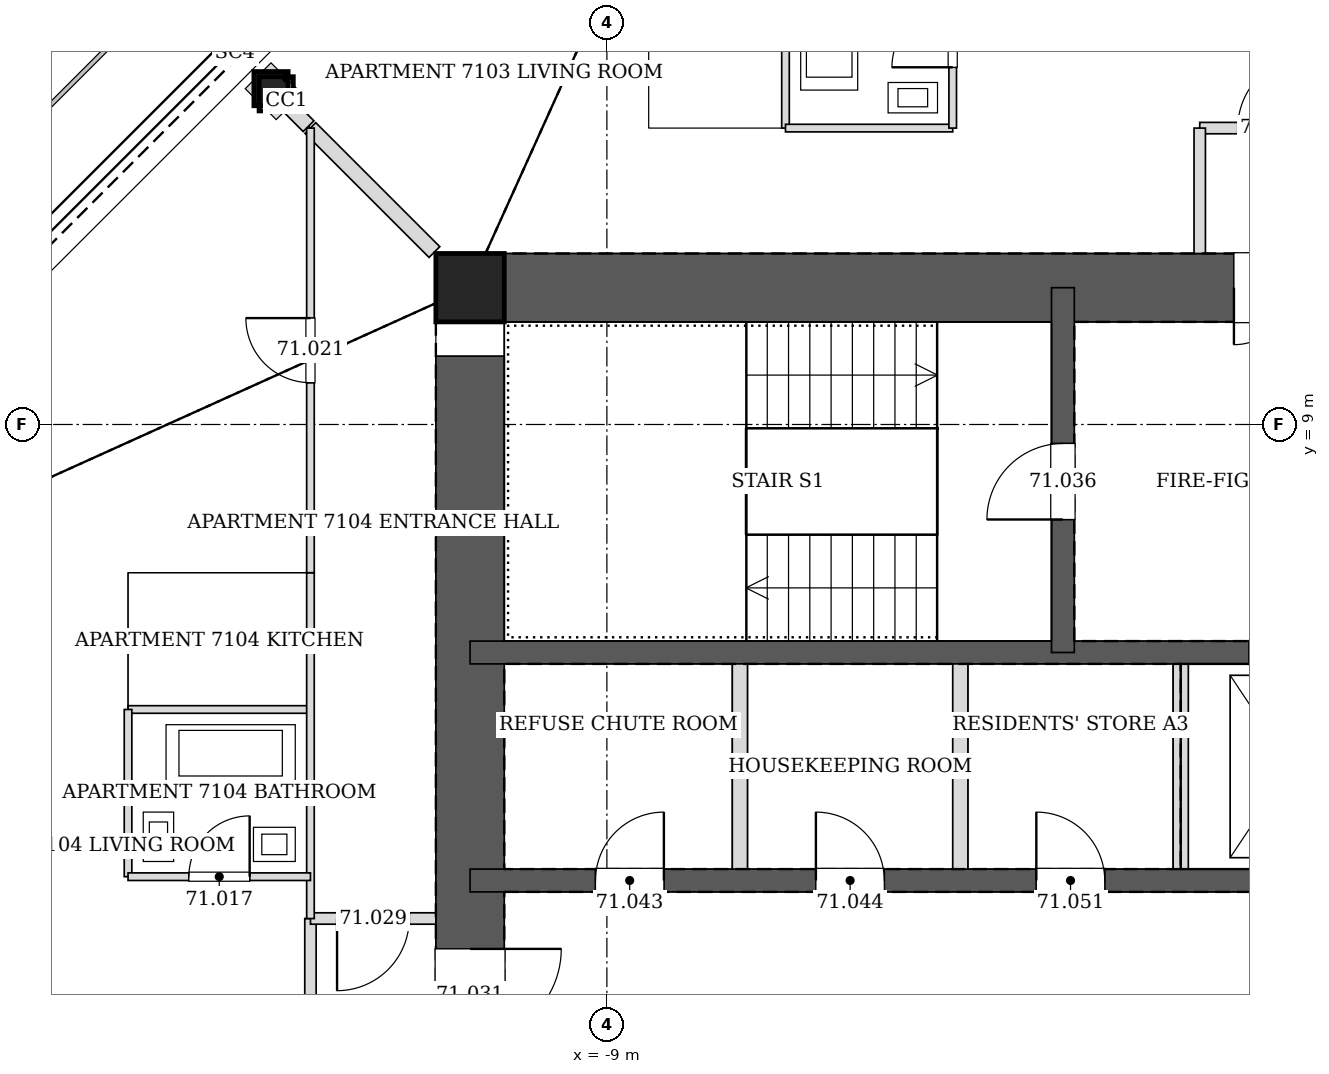
"""IFC4 building model, lengths in metres.
Left out: names, types, materials, properties, quantities, classifications, styles, units other than length and angle.
Written with IfcOpenShell. Run it as: python <this file> out.ifc"""

import sys

from ifc_helpers import new_model, si_unit, direction, frame, frame_2d, origin, origin_2d, place, context, subcontext, project, spatial, rectangle, hollow_rectangle, extrude, element, fill, save


model = new_model("IFC4")
c1 = context("Model", 3, precision=1e-05, world=origin(), true_north=direction((0.0, 1.0)))
c2 = subcontext(c1, "Body", "Model", "MODEL_VIEW")
j1 = project(units=[si_unit("LENGTHUNIT", "METRE"), si_unit("PLANEANGLEUNIT", "RADIAN")], contexts=[c1])
p1 = place(None, origin())
s1 = spatial("IfcSite", under=j1, at=p1, CompositionType="ELEMENT")
p2 = place(p1, origin())
s2 = spatial("IfcBuilding", under=s1, at=p2, CompositionType="ELEMENT")
p3 = place(p2, frame((0.0, 0.0, 291.2)))
s3 = spatial("IfcBuildingStorey", under=s2, at=p3, CompositionType="ELEMENT", Elevation=291.2)
p4 = place(p3, frame((-13.419, 13.419, 0.0), z_axis=(0.020024994503, -0.020024994503, 0.999598919162), x_axis=(0.707106781187, 0.707106781187, 0.0)))
e1 = element("IfcColumn", 1, at=p4, inside=s3, PredefinedType="COLUMN", context=c2, shape_type="SweptSolid", body=[
    extrude(hollow_rectangle(XDim=0.45, YDim=0.45, WallThickness=0.02, at=origin_2d()), origin(), (0.0, 0.0, 1.0), 3.402),
])
p5 = place(p3, frame((-10.8, 10.8, 0.0), z_axis=(0.0, 0.0, 1.0), x_axis=(1.0, 0.0, 0.0)))
e2 = element("IfcColumn", 2, at=p5, inside=s3, PredefinedType="COLUMN", context=c2, shape_type="SweptSolid", body=[
    extrude(hollow_rectangle(XDim=0.9, YDim=0.9, WallThickness=0.04, at=origin_2d()), origin(), (0.0, 0.0, 1.0), 3.4),
])
p6 = place(p3, frame((10.8, 10.8, 0.0), z_axis=(0.0, 0.0, 1.0), x_axis=(-1.0, 0.0, 0.0)))
e3 = element("IfcWall", 3, at=p6, inside=s3, PredefinedType="SOLIDWALL", context=c2, shape_type="SweptSolid", body=[
    extrude(rectangle(XDim=21.6, YDim=0.9, at=frame_2d((10.8, 0.0))), origin(), (0.0, 0.0, 1.0), 3.4),
])
p7 = place(p6, frame((10.05, 0.0, 0.0)))
e4 = element("IfcOpeningElement", 4, at=p7, cuts=e3, PredefinedType="OPENING", context=c2, shape_type="SweptSolid", body=[
    extrude(rectangle(XDim=1.5, YDim=2.1, at=frame_2d((0.75, 1.05))), frame((0.0, 0.46, 0.0), z_axis=(0.0, -1.0, 0.0), x_axis=(1.0, 0.0, 0.0)), (0.0, 0.0, 1.0), 0.92),
])
p8 = place(p3, frame((-10.8, 10.8, 0.0), z_axis=(0.0, 0.0, 1.0), x_axis=(0.0, -1.0, 0.0)))
e5 = element("IfcWall", 5, at=p8, inside=s3, PredefinedType="SOLIDWALL", context=c2, shape_type="SweptSolid", body=[
    extrude(rectangle(XDim=21.6, YDim=0.9, at=frame_2d((10.8, 0.0))), origin(), (0.0, 0.0, 1.0), 3.4),
])
p9 = place(p8, frame((8.7, 0.0, 0.0)))
e6 = element("IfcOpeningElement", 6, at=p9, cuts=e5, PredefinedType="OPENING", context=c2, shape_type="SweptSolid", body=[
    extrude(rectangle(XDim=1.2, YDim=2.1, at=frame_2d((0.6, 1.05))), frame((0.0, 0.46, 0.0), z_axis=(0.0, -1.0, 0.0), x_axis=(1.0, 0.0, 0.0)), (0.0, 0.0, 1.0), 0.92),
])
p10 = place(p8, frame((11.7, 0.0, 0.0)))
e7 = element("IfcOpeningElement", 7, at=p10, cuts=e5, PredefinedType="OPENING", context=c2, shape_type="SweptSolid", body=[
    extrude(rectangle(XDim=1.2, YDim=2.1, at=frame_2d((0.6, 1.05))), frame((0.0, 0.46, 0.0), z_axis=(0.0, -1.0, 0.0), x_axis=(1.0, 0.0, 0.0)), (0.0, 0.0, 1.0), 0.92),
])
p11 = place(p3, frame((-10.8, 3.0, 0.0), z_axis=(0.0, 0.0, 1.0), x_axis=(1.0, 0.0, 0.0)))
e8 = element("IfcWall", 8, at=p11, inside=s3, PredefinedType="SOLIDWALL", context=c2, shape_type="SweptSolid", body=[
    extrude(rectangle(XDim=21.6, YDim=0.3, at=frame_2d((10.8, 0.0))), origin(), (0.0, 0.0, 1.0), 3.4),
])
p12 = place(p11, frame((1.65, 0.0, 0.0)))
e9 = element("IfcOpeningElement", 9, at=p12, cuts=e8, PredefinedType="OPENING", context=c2, shape_type="SweptSolid", body=[
    extrude(rectangle(XDim=0.9, YDim=2.1, at=frame_2d((0.45, 1.05))), frame((0.0, 0.16, 0.0), z_axis=(0.0, -1.0, 0.0), x_axis=(1.0, 0.0, 0.0)), (0.0, 0.0, 1.0), 0.32),
])
p13 = place(p11, frame((4.55, 0.0, 0.0)))
e10 = element("IfcOpeningElement", 10, at=p13, cuts=e8, PredefinedType="OPENING", context=c2, shape_type="SweptSolid", body=[
    extrude(rectangle(XDim=0.9, YDim=2.1, at=frame_2d((0.45, 1.05))), frame((0.0, 0.16, 0.0), z_axis=(0.0, -1.0, 0.0), x_axis=(1.0, 0.0, 0.0)), (0.0, 0.0, 1.0), 0.32),
])
p14 = place(p11, frame((13.25, 0.0, 0.0)))
e11 = element("IfcOpeningElement", 11, at=p14, cuts=e8, PredefinedType="OPENING", context=c2, shape_type="SweptSolid", body=[
    extrude(rectangle(XDim=0.9, YDim=2.1, at=frame_2d((0.45, 1.05))), frame((0.0, 0.16, 0.0), z_axis=(0.0, -1.0, 0.0), x_axis=(1.0, 0.0, 0.0)), (0.0, 0.0, 1.0), 0.32),
])
p15 = place(p11, frame((16.15, 0.0, 0.0)))
e12 = element("IfcOpeningElement", 12, at=p15, cuts=e8, PredefinedType="OPENING", context=c2, shape_type="SweptSolid", body=[
    extrude(rectangle(XDim=0.9, YDim=2.1, at=frame_2d((0.45, 1.05))), frame((0.0, 0.16, 0.0), z_axis=(0.0, -1.0, 0.0), x_axis=(1.0, 0.0, 0.0)), (0.0, 0.0, 1.0), 0.32),
])
p16 = place(p11, frame((7.45, 0.0, 0.0)))
e13 = element("IfcOpeningElement", 13, at=p16, cuts=e8, PredefinedType="OPENING", context=c2, shape_type="SweptSolid", body=[
    extrude(rectangle(XDim=0.9, YDim=2.1, at=frame_2d((0.45, 1.05))), frame((0.0, 0.16, 0.0), z_axis=(0.0, -1.0, 0.0), x_axis=(1.0, 0.0, 0.0)), (0.0, 0.0, 1.0), 0.32),
])
p17 = place(p11, frame((19.05, 0.0, 0.0)))
e14 = element("IfcOpeningElement", 14, at=p17, cuts=e8, PredefinedType="OPENING", context=c2, shape_type="SweptSolid", body=[
    extrude(rectangle(XDim=0.9, YDim=2.1, at=frame_2d((0.45, 1.05))), frame((0.0, 0.16, 0.0), z_axis=(0.0, -1.0, 0.0), x_axis=(1.0, 0.0, 0.0)), (0.0, 0.0, 1.0), 0.32),
])
p18 = place(p3, frame((-10.8, 6.0, 0.0), z_axis=(0.0, 0.0, 1.0), x_axis=(1.0, 0.0, 0.0)))
e15 = element("IfcWall", 15, at=p18, inside=s3, PredefinedType="SOLIDWALL", context=c2, shape_type="SweptSolid", body=[
    extrude(rectangle(XDim=21.6, YDim=0.3, at=frame_2d((10.8, 0.0))), origin(), (0.0, 0.0, 1.0), 3.4),
])
p19 = place(p18, frame((10.25, 0.0, 0.0)))
e16 = element("IfcOpeningElement", 16, at=p19, cuts=e15, PredefinedType="OPENING", context=c2, shape_type="SweptSolid", body=[
    extrude(rectangle(XDim=1.1, YDim=2.1, at=frame_2d((0.55, 1.05))), frame((0.0, 0.16, 0.0), z_axis=(0.0, -1.0, 0.0), x_axis=(1.0, 0.0, 0.0)), (0.0, 0.0, 1.0), 0.32),
])
p20 = place(p3, frame((-3.0, 6.0, 0.0), z_axis=(0.0, 0.0, 1.0), x_axis=(0.0, 1.0, 0.0)))
e17 = element("IfcWall", 17, at=p20, inside=s3, PredefinedType="SOLIDWALL", context=c2, shape_type="SweptSolid", body=[
    extrude(rectangle(XDim=4.8, YDim=0.3, at=frame_2d((2.4, 0.0))), origin(), (0.0, 0.0, 1.0), 3.4),
])
p21 = place(p20, frame((1.75, 0.0, 0.0)))
e18 = element("IfcOpeningElement", 18, at=p21, cuts=e17, PredefinedType="OPENING", context=c2, shape_type="SweptSolid", body=[
    extrude(rectangle(XDim=1.0, YDim=2.1, at=frame_2d((0.5, 1.05))), frame((0.0, 0.16, 0.0), z_axis=(0.0, -1.0, 0.0), x_axis=(1.0, 0.0, 0.0)), (0.0, 0.0, 1.0), 0.32),
])
p22 = place(p3, frame((0.751, 12.9, 0.0), z_axis=(0.0, 0.0, 1.0), x_axis=(-1.0, 0.0, 0.0)))
e19 = element("IfcWall", 19, at=p22, inside=s3, PredefinedType="PARTITIONING", context=c2, shape_type="SweptSolid", body=[
    extrude(rectangle(XDim=1.951, YDim=0.15, at=frame_2d((0.976, 0.0))), origin(), (0.0, 0.0, 1.0), 2.349),
])
p23 = place(p22, frame((0.5, 0.0, 0.0)))
e20 = element("IfcOpeningElement", 20, at=p23, cuts=e19, PredefinedType="OPENING", context=c2, shape_type="SweptSolid", body=[
    extrude(rectangle(XDim=0.95, YDim=2.1, at=frame_2d((0.475, 1.05))), frame((0.0, 0.085, 0.0), z_axis=(0.0, -1.0, 0.0), x_axis=(1.0, 0.0, 0.0)), (0.0, 0.0, 1.0), 0.17),
])
p24 = place(p3, frame((-1.2, 12.9, 0.0), z_axis=(0.0, 0.0, 1.0), x_axis=(0.0, -1.0, 0.0)))
e21 = element("IfcWall", 21, at=p24, inside=s3, PredefinedType="PARTITIONING", context=c2, shape_type="SweptSolid", body=[
    extrude(rectangle(XDim=1.65, YDim=0.15, at=frame_2d((0.825, 0.0))), origin(), (0.0, 0.0, 1.0), 3.2),
])
p25 = place(p3, frame((-12.9, 2.5, 0.0), z_axis=(0.0, 0.0, 1.0), x_axis=(0.0, -1.0, 0.0)))
e22 = element("IfcWall", 22, at=p25, inside=s3, PredefinedType="PARTITIONING", context=c2, shape_type="SweptSolid", body=[
    extrude(rectangle(XDim=9.251, YDim=0.15, at=frame_2d((4.625, 0.0))), origin(), (0.0, 0.0, 1.0), 2.349),
])
p26 = place(p3, frame((-11.25, 2.5, 0.0), z_axis=(0.0, 0.0, 1.0), x_axis=(-1.0, 0.0, 0.0)))
e23 = element("IfcWall", 23, at=p26, inside=s3, PredefinedType="PARTITIONING", context=c2, shape_type="SweptSolid", body=[
    extrude(rectangle(XDim=1.65, YDim=0.15, at=frame_2d((0.825, 0.0))), origin(), (0.0, 0.0, 1.0), 3.2),
])
p27 = place(p26, frame((0.35, 0.0, 0.0)))
e24 = element("IfcOpeningElement", 24, at=p27, cuts=e23, PredefinedType="OPENING", context=c2, shape_type="SweptSolid", body=[
    extrude(rectangle(XDim=0.95, YDim=2.1, at=frame_2d((0.475, 1.05))), frame((0.0, 0.085, 0.0), z_axis=(0.0, -1.0, 0.0), x_axis=(1.0, 0.0, 0.0)), (0.0, 0.0, 1.0), 0.17),
])
p28 = place(p3, frame((-6.65, 12.9, 0.0), z_axis=(0.0, 0.0, 1.0), x_axis=(0.0, 1.0, 0.0)))
e25 = element("IfcWall", 25, at=p28, inside=s3, PredefinedType="PARTITIONING", context=c2, shape_type="SweptSolid", body=[
    extrude(rectangle(XDim=2.4, YDim=0.1, at=frame_2d((1.2, 0.0))), origin(), (0.0, 0.0, 1.0), 2.73),
])
p29 = place(p3, frame((-6.65, 12.9, 0.0), z_axis=(0.0, 0.0, 1.0), x_axis=(1.0, 0.0, 0.0)))
e26 = element("IfcWall", 26, at=p29, inside=s3, PredefinedType="PARTITIONING", context=c2, shape_type="SweptSolid", body=[
    extrude(rectangle(XDim=2.2, YDim=0.1, at=frame_2d((1.1, 0.0))), origin(), (0.0, 0.0, 1.0), 3.2),
])
p30 = place(p3, frame((-4.45, 12.9, 0.0), z_axis=(0.0, 0.0, 1.0), x_axis=(0.0, 1.0, 0.0)))
e27 = element("IfcWall", 27, at=p30, inside=s3, PredefinedType="PARTITIONING", context=c2, shape_type="SweptSolid", body=[
    extrude(rectangle(XDim=2.4, YDim=0.1, at=frame_2d((1.2, 0.0))), origin(), (0.0, 0.0, 1.0), 2.73),
])
p31 = place(p30, frame((0.8, 0.0, 0.0)))
e28 = element("IfcOpeningElement", 28, at=p31, cuts=e27, PredefinedType="OPENING", context=c2, shape_type="SweptSolid", body=[
    extrude(rectangle(XDim=0.8, YDim=2.1, at=frame_2d((0.4, 1.05))), frame((0.0, 0.06, 0.0), z_axis=(0.0, -1.0, 0.0), x_axis=(1.0, 0.0, 0.0)), (0.0, 0.0, 1.0), 0.12),
])
p32 = place(p3, frame((-13.178, 13.178, 0.0), z_axis=(0.0, 0.0, 1.0), x_axis=(0.707106781187, -0.707106781187, 0.0)))
e29 = element("IfcWall", 29, at=p32, inside=s3, PredefinedType="PARTITIONING", context=c2, shape_type="SweptSolid", body=[
    extrude(rectangle(XDim=0.358, YDim=0.2, at=frame_2d((0.179, 0.0))), origin(), (0.0, 0.0, 1.0), 2.591),
])
p33 = place(p3, frame((-12.901, 12.901, 0.0), z_axis=(0.0, 0.0, 1.0), x_axis=(0.707106781187, -0.707106781187, 0.0)))
e30 = element("IfcWall", 30, at=p33, inside=s3, PredefinedType="PARTITIONING", context=c2, shape_type="SweptSolid", body=[
    extrude(rectangle(XDim=2.308, YDim=0.2, at=frame_2d((1.154, 0.0))), origin(), (0.0, 0.0, 1.0), 2.591),
])
p34 = place(p3, frame((-15.3, 5.25, 0.0), z_axis=(0.0, 0.0, 1.0), x_axis=(1.0, 0.0, 0.0)))
e31 = element("IfcWall", 31, at=p34, inside=s3, PredefinedType="PARTITIONING", context=c2, shape_type="SweptSolid", body=[
    extrude(rectangle(XDim=2.4, YDim=0.1, at=frame_2d((1.2, 0.0))), origin(), (0.0, 0.0, 1.0), 2.73),
])
p35 = place(p3, frame((-12.9, 7.05, 0.0), z_axis=(0.0, 0.0, 1.0), x_axis=(0.0, -1.0, 0.0)))
e32 = element("IfcWall", 32, at=p35, inside=s3, PredefinedType="PARTITIONING", context=c2, shape_type="SweptSolid", body=[
    extrude(rectangle(XDim=4.551, YDim=0.1, at=frame_2d((2.275, 0.0))), origin(), (0.0, 0.0, 1.0), 3.2),
])
p36 = place(p3, frame((-15.3, 5.25, 0.0), z_axis=(0.0, 0.0, 1.0), x_axis=(0.0, -1.0, 0.0)))
e33 = element("IfcWall", 33, at=p36, inside=s3, PredefinedType="PARTITIONING", context=c2, shape_type="SweptSolid", body=[
    extrude(rectangle(XDim=2.2, YDim=0.1, at=frame_2d((1.1, 0.0))), origin(), (0.0, 0.0, 1.0), 3.2),
])
p37 = place(p3, frame((-15.3, 3.05, 0.0), z_axis=(0.0, 0.0, 1.0), x_axis=(1.0, 0.0, 0.0)))
e34 = element("IfcWall", 34, at=p37, inside=s3, PredefinedType="PARTITIONING", context=c2, shape_type="SweptSolid", body=[
    extrude(rectangle(XDim=2.4, YDim=0.1, at=frame_2d((1.2, 0.0))), origin(), (0.0, 0.0, 1.0), 2.73),
])
p38 = place(p37, frame((0.8, 0.0, 0.0)))
e35 = element("IfcOpeningElement", 35, at=p38, cuts=e34, PredefinedType="OPENING", context=c2, shape_type="SweptSolid", body=[
    extrude(rectangle(XDim=0.8, YDim=2.1, at=frame_2d((0.4, 1.05))), frame((0.0, 0.06, 0.0), z_axis=(0.0, -1.0, 0.0), x_axis=(1.0, 0.0, 0.0)), (0.0, 0.0, 1.0), 0.12),
])
p39 = place(p3, frame((-12.9, 7.05, 0.0), z_axis=(0.0, 0.0, 1.0), x_axis=(0.0, 1.0, 0.0)))
e36 = element("IfcWall", 36, at=p39, inside=s3, PredefinedType="PARTITIONING", context=c2, shape_type="SweptSolid", body=[
    extrude(rectangle(XDim=5.85, YDim=0.1, at=frame_2d((2.925, 0.0))), origin(), (0.0, 0.0, 1.0), 2.497),
])
p40 = place(p39, frame((2.5, 0.0, 0.0)))
e37 = element("IfcOpeningElement", 37, at=p40, cuts=e36, PredefinedType="OPENING", context=c2, shape_type="SweptSolid", body=[
    extrude(rectangle(XDim=0.85, YDim=2.1, at=frame_2d((0.425, 1.05))), frame((0.0, 0.06, 0.0), z_axis=(0.0, -1.0, 0.0), x_axis=(1.0, 0.0, 0.0)), (0.0, 0.0, 1.0), 0.12),
])
for number, where, z_axis, x_axis in (
    (38, (-7.25, 3.15, 0.0), (0.0, 0.0, 1.0), (0.0, 1.0, 0.0)),
    (39, (-4.35, 3.15, 0.0), (0.0, 0.0, 1.0), (0.0, 1.0, 0.0)),
    (40, (-1.45, 3.15, 0.0), (0.0, 0.0, 1.0), (0.0, 1.0, 0.0)),
):
    element("IfcWall", number, at=place(p3, frame(where, z_axis=z_axis, x_axis=x_axis)), inside=s3, PredefinedType="PARTITIONING", context=c2, shape_type="SweptSolid", body=[
        extrude(rectangle(XDim=2.7, YDim=0.2, at=frame_2d((1.35, 0.0))), origin(), (0.0, 0.0, 1.0), 3.2),
    ])
p41 = place(p31, origin())
e41 = element("IfcDoor", 41, at=p41, inside=s3, OperationType="SINGLE_SWING_LEFT", PredefinedType="DOOR", context=c2, shape_type="SweptSolid", body=[
    extrude(rectangle(XDim=0.8, YDim=2.1, at=frame_2d((0.4, 1.05))), frame((0.0, 0.025, 0.0), z_axis=(0.0, -1.0, 0.0), x_axis=(1.0, 0.0, 0.0)), (0.0, 0.0, 1.0), 0.05),
])
fill(e28, e41)
p42 = place(p23, frame((0.95, 0.0, 0.0), z_axis=(0.0, 0.0, 1.0), x_axis=(-1.0, 0.0, 0.0)))
e42 = element("IfcDoor", 42, at=p42, inside=s3, OperationType="SINGLE_SWING_RIGHT", PredefinedType="DOOR", context=c2, shape_type="SweptSolid", body=[
    extrude(rectangle(XDim=0.95, YDim=2.1, at=frame_2d((0.475, 1.05))), frame((0.0, 0.025, 0.0), z_axis=(0.0, -1.0, 0.0), x_axis=(1.0, 0.0, 0.0)), (0.0, 0.0, 1.0), 0.05),
])
fill(e20, e42)
p43 = place(p38, origin())
e43 = element("IfcDoor", 43, at=p43, inside=s3, OperationType="SINGLE_SWING_RIGHT", PredefinedType="DOOR", context=c2, shape_type="SweptSolid", body=[
    extrude(rectangle(XDim=0.8, YDim=2.1, at=frame_2d((0.4, 1.05))), frame((0.0, 0.025, 0.0), z_axis=(0.0, -1.0, 0.0), x_axis=(1.0, 0.0, 0.0)), (0.0, 0.0, 1.0), 0.05),
])
fill(e35, e43)
p44 = place(p40, origin())
e44 = element("IfcDoor", 44, at=p44, inside=s3, OperationType="SINGLE_SWING_RIGHT", PredefinedType="DOOR", context=c2, shape_type="SweptSolid", body=[
    extrude(rectangle(XDim=0.85, YDim=2.1, at=frame_2d((0.425, 1.05))), frame((0.0, 0.025, 0.0), z_axis=(0.0, -1.0, 0.0), x_axis=(1.0, 0.0, 0.0)), (0.0, 0.0, 1.0), 0.05),
])
fill(e37, e44)
p45 = place(p27, origin())
e45 = element("IfcDoor", 45, at=p45, inside=s3, OperationType="SINGLE_SWING_RIGHT", PredefinedType="DOOR", context=c2, shape_type="SweptSolid", body=[
    extrude(rectangle(XDim=0.95, YDim=2.1, at=frame_2d((0.475, 1.05))), frame((0.0, 0.025, 0.0), z_axis=(0.0, -1.0, 0.0), x_axis=(1.0, 0.0, 0.0)), (0.0, 0.0, 1.0), 0.05),
])
fill(e24, e45)
p46 = place(p9, origin())
e46 = element("IfcDoor", 46, at=p46, inside=s3, OperationType="SINGLE_SWING_LEFT", PredefinedType="DOOR", context=c2, shape_type="SweptSolid", body=[
    extrude(rectangle(XDim=1.2, YDim=2.1, at=frame_2d((0.6, 1.05))), frame((0.0, 0.025, 0.0), z_axis=(0.0, -1.0, 0.0), x_axis=(1.0, 0.0, 0.0)), (0.0, 0.0, 1.0), 0.05),
])
fill(e6, e46)
p47 = place(p7, origin())
e47 = element("IfcDoor", 47, at=p47, inside=s3, OperationType="DOUBLE_DOOR_SINGLE_SWING", PredefinedType="DOOR", context=c2, shape_type="SweptSolid", body=[
    extrude(rectangle(XDim=1.5, YDim=2.1, at=frame_2d((0.75, 1.05))), frame((0.0, 0.025, 0.0), z_axis=(0.0, -1.0, 0.0), x_axis=(1.0, 0.0, 0.0)), (0.0, 0.0, 1.0), 0.05),
])
fill(e4, e47)
p48 = place(p21, origin())
e48 = element("IfcDoor", 48, at=p48, inside=s3, OperationType="SINGLE_SWING_LEFT", PredefinedType="DOOR", context=c2, shape_type="SweptSolid", body=[
    extrude(rectangle(XDim=1.0, YDim=2.1, at=frame_2d((0.5, 1.05))), frame((0.0, 0.025, 0.0), z_axis=(0.0, -1.0, 0.0), x_axis=(1.0, 0.0, 0.0)), (0.0, 0.0, 1.0), 0.05),
])
fill(e18, e48)
p49 = place(p12, origin())
e49 = element("IfcDoor", 49, at=p49, inside=s3, OperationType="SINGLE_SWING_RIGHT", PredefinedType="DOOR", context=c2, shape_type="SweptSolid", body=[
    extrude(rectangle(XDim=0.9, YDim=2.1, at=frame_2d((0.45, 1.05))), frame((0.0, 0.025, 0.0), z_axis=(0.0, -1.0, 0.0), x_axis=(1.0, 0.0, 0.0)), (0.0, 0.0, 1.0), 0.05),
])
fill(e9, e49)
p50 = place(p13, origin())
e50 = element("IfcDoor", 50, at=p50, inside=s3, OperationType="SINGLE_SWING_LEFT", PredefinedType="DOOR", context=c2, shape_type="SweptSolid", body=[
    extrude(rectangle(XDim=0.9, YDim=2.1, at=frame_2d((0.45, 1.05))), frame((0.0, 0.025, 0.0), z_axis=(0.0, -1.0, 0.0), x_axis=(1.0, 0.0, 0.0)), (0.0, 0.0, 1.0), 0.05),
])
fill(e10, e50)
p51 = place(p16, origin())
e51 = element("IfcDoor", 51, at=p51, inside=s3, OperationType="SINGLE_SWING_LEFT", PredefinedType="DOOR", context=c2, shape_type="SweptSolid", body=[
    extrude(rectangle(XDim=0.9, YDim=2.1, at=frame_2d((0.45, 1.05))), frame((0.0, 0.025, 0.0), z_axis=(0.0, -1.0, 0.0), x_axis=(1.0, 0.0, 0.0)), (0.0, 0.0, 1.0), 0.05),
])
fill(e13, e51)
save(model, sys.argv[1])
